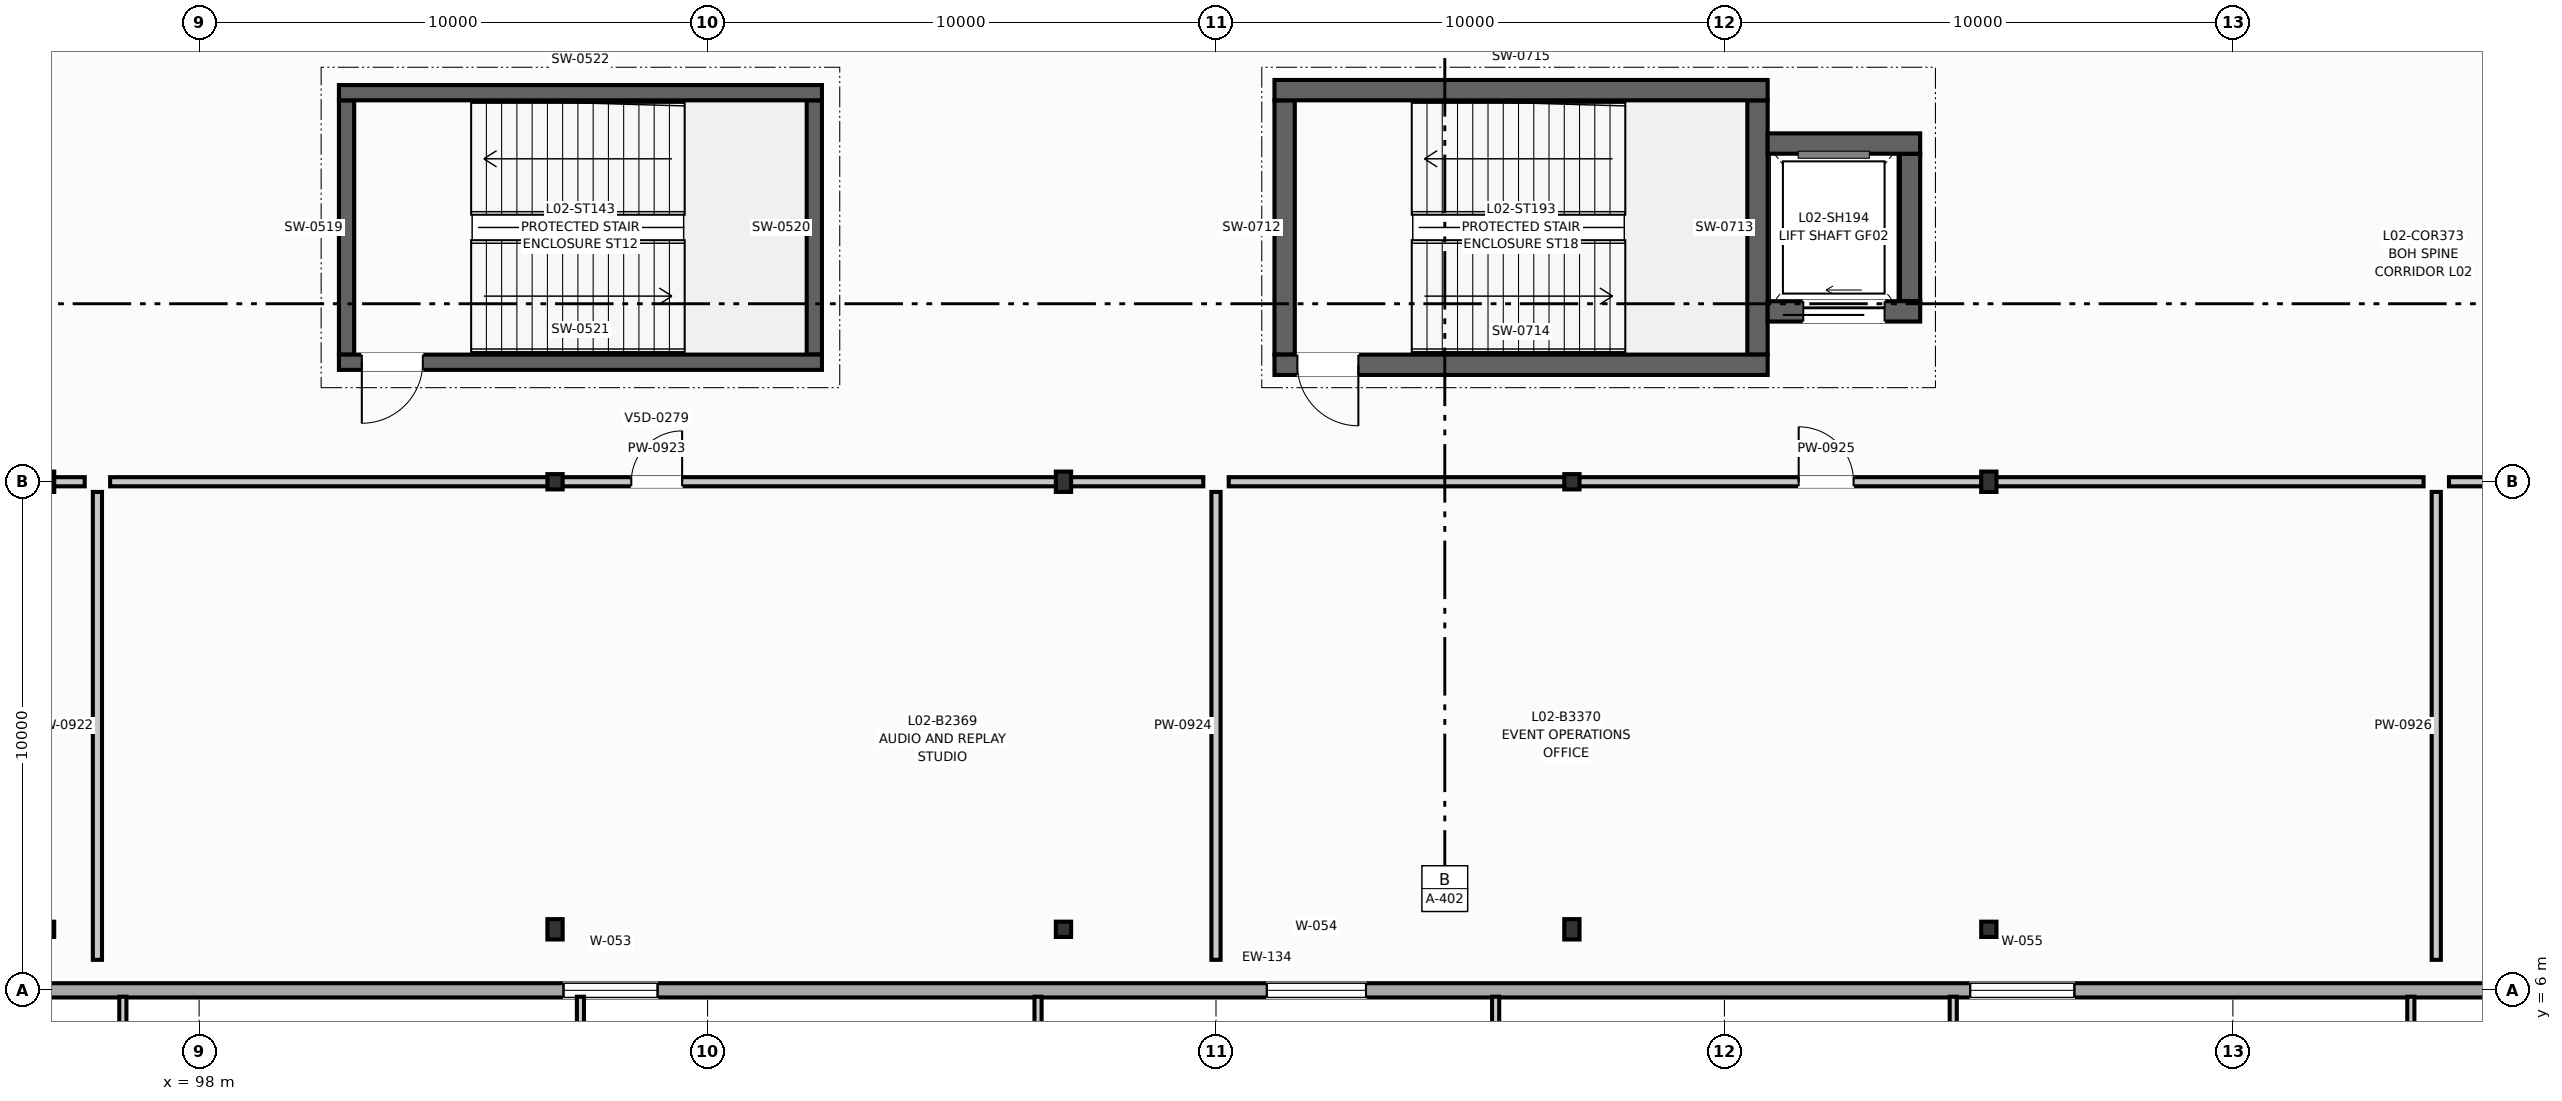
"""IFC4 building model, lengths in metres.
Left out: names, types, materials, properties, quantities, classifications, styles, units other than length and angle.
Written with IfcOpenShell. Run it as: python <this file> out.ifc"""

import sys

from ifc_helpers import new_model, si_unit, direction, frame, frame_2d, origin, origin_2d, place, context, subcontext, project, spatial, rectangle, i_section, extrude, element, fill, save


model = new_model("IFC4")
c1 = context("Model", 3, precision=1e-05, world=origin(), true_north=direction((0.0, 1.0)))
c2 = subcontext(c1, "Body", "Model", "MODEL_VIEW")
j1 = project(units=[si_unit("LENGTHUNIT", "METRE"), si_unit("PLANEANGLEUNIT", "RADIAN")], contexts=[c1])
p1 = place(None, origin())
s1 = spatial("IfcSite", under=j1, at=p1, CompositionType="ELEMENT")
p2 = place(p1, origin())
s2 = spatial("IfcBuilding", under=s1, at=p2, CompositionType="ELEMENT")
p3 = place(p2, frame((0.0, 0.0, 9.0)))
s3 = spatial("IfcBuildingStorey", under=s2, at=p3, CompositionType="ELEMENT", Elevation=9.0)
p4 = place(p3, frame((95.0, 7.2, 0.0), z_axis=(0.0, 0.0, 1.0), x_axis=(1.0, 0.0, 0.0)))
e1 = element("IfcColumn", 1, at=p4, inside=s3, PredefinedType="COLUMN", context=c2, shape_type="SweptSolid", body=[
    extrude(i_section(OverallWidth=0.3, OverallDepth=0.3, WebThickness=0.011, FlangeThickness=0.019, at=origin_2d()), origin(), (0.0, 0.0, 1.0), 4.5),
])
for number, where, z_axis, x_axis in (
    (2, (95.0, 16.0, 0.0), (0.0, 0.0, 1.0), (1.0, 0.0, 0.0)),
    (3, (105.0, 7.2, 0.0), (0.0, 0.0, 1.0), (1.0, 0.0, 0.0)),
):
    element("IfcColumn", number, at=place(p3, frame(where, z_axis=z_axis, x_axis=x_axis)), inside=s3, PredefinedType="COLUMN", context=c2, shape_type="SweptSolid", body=[
        extrude(i_section(OverallWidth=0.3, OverallDepth=0.4, WebThickness=0.013, FlangeThickness=0.024, at=origin_2d()), origin(), (0.0, 0.0, 1.0), 4.5),
    ])
for number, where, z_axis, x_axis in (
    (4, (105.0, 16.0, 0.0), (0.0, 0.0, 1.0), (1.0, 0.0, 0.0)),
    (5, (115.0, 7.2, 0.0), (0.0, 0.0, 1.0), (1.0, 0.0, 0.0)),
):
    element("IfcColumn", number, at=place(p3, frame(where, z_axis=z_axis, x_axis=x_axis)), inside=s3, PredefinedType="COLUMN", context=c2, shape_type="SweptSolid", body=[
        extrude(i_section(OverallWidth=0.3, OverallDepth=0.3, WebThickness=0.011, FlangeThickness=0.019, at=origin_2d()), origin(), (0.0, 0.0, 1.0), 4.5),
    ])
for number, where, z_axis, x_axis in (
    (6, (115.0, 16.0, 0.0), (0.0, 0.0, 1.0), (1.0, 0.0, 0.0)),
    (7, (125.0, 7.2, 0.0), (0.0, 0.0, 1.0), (1.0, 0.0, 0.0)),
):
    element("IfcColumn", number, at=place(p3, frame(where, z_axis=z_axis, x_axis=x_axis)), inside=s3, PredefinedType="COLUMN", context=c2, shape_type="SweptSolid", body=[
        extrude(i_section(OverallWidth=0.3, OverallDepth=0.4, WebThickness=0.013, FlangeThickness=0.024, at=origin_2d()), origin(), (0.0, 0.0, 1.0), 4.5),
    ])
for number, where, z_axis, x_axis in (
    (8, (125.0, 16.0, 0.0), (0.0, 0.0, 1.0), (1.0, 0.0, 0.0)),
    (9, (133.2, 7.2, 0.0), (0.0, 0.0, 1.0), (1.0, 0.0, 0.0)),
):
    element("IfcColumn", number, at=place(p3, frame(where, z_axis=z_axis, x_axis=x_axis)), inside=s3, PredefinedType="COLUMN", context=c2, shape_type="SweptSolid", body=[
        extrude(i_section(OverallWidth=0.3, OverallDepth=0.3, WebThickness=0.011, FlangeThickness=0.019, at=origin_2d()), origin(), (0.0, 0.0, 1.0), 4.5),
    ])
p5 = place(p3, frame((133.2, 16.0, 0.0), z_axis=(0.0, 0.0, 1.0), x_axis=(1.0, 0.0, 0.0)))
e10 = element("IfcColumn", 10, at=p5, inside=s3, PredefinedType="COLUMN", context=c2, shape_type="SweptSolid", body=[
    extrude(i_section(OverallWidth=0.3, OverallDepth=0.4, WebThickness=0.013, FlangeThickness=0.024, at=origin_2d()), origin(), (0.0, 0.0, 1.0), 4.5),
])
p6 = place(p3, frame((74.0, 6.0, 0.0), z_axis=(0.0, 0.0, 1.0), x_axis=(1.0, 0.0, 0.0)))
e11 = element("IfcWall", 11, at=p6, inside=s3, PredefinedType="SOLIDWALL", context=c2, shape_type="SweptSolid", body=[
    extrude(rectangle(XDim=90.0, YDim=0.28, at=frame_2d((45.0, 0.0))), origin(), (0.0, 0.0, 1.0), 3.5),
])
p7 = place(p6, frame((3.5, 0.0, 0.85)))
e12 = element("IfcOpeningElement", 12, at=p7, cuts=e11, PredefinedType="OPENING", context=c2, shape_type="SweptSolid", body=[
    extrude(rectangle(XDim=1.65, YDim=2.1, at=frame_2d((0.825, 1.05))), frame((0.0, 0.15, 0.0), z_axis=(0.0, -1.0, 0.0), x_axis=(1.0, 0.0, 0.0)), (0.0, 0.0, 1.0), 0.3),
])
p8 = place(p6, frame((17.333, 0.0, 0.85)))
e13 = element("IfcOpeningElement", 13, at=p8, cuts=e11, PredefinedType="OPENING", context=c2, shape_type="SweptSolid", body=[
    extrude(rectangle(XDim=1.75, YDim=2.15, at=frame_2d((0.875, 1.075))), frame((0.0, 0.15, 0.0), z_axis=(0.0, -1.0, 0.0), x_axis=(1.0, 0.0, 0.0)), (0.0, 0.0, 1.0), 0.3),
])
p9 = place(p6, frame((31.167, 0.0, 0.85)))
e14 = element("IfcOpeningElement", 14, at=p9, cuts=e11, PredefinedType="OPENING", context=c2, shape_type="SweptSolid", body=[
    extrude(rectangle(XDim=1.85, YDim=2.2, at=frame_2d((0.925, 1.1))), frame((0.0, 0.15, 0.0), z_axis=(0.0, -1.0, 0.0), x_axis=(1.0, 0.0, 0.0)), (0.0, 0.0, 1.0), 0.3),
])
p10 = place(p6, frame((45.0, 0.0, 0.85)))
e15 = element("IfcOpeningElement", 15, at=p10, cuts=e11, PredefinedType="OPENING", context=c2, shape_type="SweptSolid", body=[
    extrude(rectangle(XDim=1.95, YDim=2.25, at=frame_2d((0.975, 1.125))), frame((0.0, 0.15, 0.0), z_axis=(0.0, -1.0, 0.0), x_axis=(1.0, 0.0, 0.0)), (0.0, 0.0, 1.0), 0.3),
])
p11 = place(p6, frame((58.833, 0.0, 0.85)))
e16 = element("IfcOpeningElement", 16, at=p11, cuts=e11, PredefinedType="OPENING", context=c2, shape_type="SweptSolid", body=[
    extrude(rectangle(XDim=2.05, YDim=2.3, at=frame_2d((1.025, 1.15))), frame((0.0, 0.15, 0.0), z_axis=(0.0, -1.0, 0.0), x_axis=(1.0, 0.0, 0.0)), (0.0, 0.0, 1.0), 0.3),
])
p12 = place(p6, frame((72.667, 0.0, 0.85)))
e17 = element("IfcOpeningElement", 17, at=p12, cuts=e11, PredefinedType="OPENING", context=c2, shape_type="SweptSolid", body=[
    extrude(rectangle(XDim=2.15, YDim=2.35, at=frame_2d((1.075, 1.175))), frame((0.0, 0.15, 0.0), z_axis=(0.0, -1.0, 0.0), x_axis=(1.0, 0.0, 0.0)), (0.0, 0.0, 1.0), 0.3),
])
for number, where, z_axis, x_axis in (
    (18, (100.9, 18.5, 0.0), (0.0, 0.0, 1.0), (0.0, 1.0, 0.0)),
    (19, (110.1, 18.5, 0.0), (0.0, 0.0, 1.0), (0.0, 1.0, 0.0)),
):
    element("IfcWall", number, at=place(p3, frame(where, z_axis=z_axis, x_axis=x_axis)), inside=s3, PredefinedType="SHEAR", context=c2, shape_type="SweptSolid", body=[
        extrude(rectangle(XDim=5.0, YDim=0.3, at=frame_2d((2.5, 0.0))), origin(), (0.0, 0.0, 1.0), 4.25),
    ])
p13 = place(p3, frame((100.75, 18.35, 0.0), z_axis=(0.0, 0.0, 1.0), x_axis=(1.0, 0.0, 0.0)))
e20 = element("IfcWall", 20, at=p13, inside=s3, PredefinedType="SHEAR", context=c2, shape_type="SweptSolid", body=[
    extrude(rectangle(XDim=9.5, YDim=0.3, at=frame_2d((4.75, 0.0))), origin(), (0.0, 0.0, 1.0), 4.25),
])
p14 = place(p13, frame((0.45, 0.0, 0.0)))
e21 = element("IfcOpeningElement", 21, at=p14, cuts=e20, PredefinedType="OPENING", context=c2, shape_type="SweptSolid", body=[
    extrude(rectangle(XDim=1.2, YDim=2.2, at=frame_2d((0.6, 1.1))), frame((0.0, 0.16, 0.0), z_axis=(0.0, -1.0, 0.0), x_axis=(1.0, 0.0, 0.0)), (0.0, 0.0, 1.0), 0.32),
])
p15 = place(p3, frame((100.75, 23.65, 0.0), z_axis=(0.0, 0.0, 1.0), x_axis=(1.0, 0.0, 0.0)))
e22 = element("IfcWall", 22, at=p15, inside=s3, PredefinedType="SHEAR", context=c2, shape_type="SweptSolid", body=[
    extrude(rectangle(XDim=9.5, YDim=0.3, at=frame_2d((4.75, 0.0))), origin(), (0.0, 0.0, 1.0), 4.25),
])
for number, where, z_axis, x_axis in (
    (23, (119.35, 18.5, 0.0), (0.0, 0.0, 1.0), (0.0, 1.0, 0.0)),
    (24, (128.65, 18.5, 0.0), (0.0, 0.0, 1.0), (0.0, 1.0, 0.0)),
):
    element("IfcWall", number, at=place(p3, frame(where, z_axis=z_axis, x_axis=x_axis)), inside=s3, PredefinedType="SHEAR", context=c2, shape_type="SweptSolid", body=[
        extrude(rectangle(XDim=5.0, YDim=0.4, at=frame_2d((2.5, 0.0))), origin(), (0.0, 0.0, 1.0), 4.25),
    ])
p16 = place(p3, frame((119.15, 18.3, 0.0), z_axis=(0.0, 0.0, 1.0), x_axis=(1.0, 0.0, 0.0)))
e25 = element("IfcWall", 25, at=p16, inside=s3, PredefinedType="SHEAR", context=c2, shape_type="SweptSolid", body=[
    extrude(rectangle(XDim=9.7, YDim=0.4, at=frame_2d((4.85, 0.0))), origin(), (0.0, 0.0, 1.0), 4.25),
])
p17 = place(p16, frame((0.45, 0.0, 0.0)))
e26 = element("IfcOpeningElement", 26, at=p17, cuts=e25, PredefinedType="OPENING", context=c2, shape_type="SweptSolid", body=[
    extrude(rectangle(XDim=1.2, YDim=2.2, at=frame_2d((0.6, 1.1))), frame((0.0, 0.21, 0.0), z_axis=(0.0, -1.0, 0.0), x_axis=(1.0, 0.0, 0.0)), (0.0, 0.0, 1.0), 0.42),
])
p18 = place(p3, frame((119.15, 23.7, 0.0), z_axis=(0.0, 0.0, 1.0), x_axis=(1.0, 0.0, 0.0)))
e27 = element("IfcWall", 27, at=p18, inside=s3, PredefinedType="SHEAR", context=c2, shape_type="SweptSolid", body=[
    extrude(rectangle(XDim=9.7, YDim=0.4, at=frame_2d((4.85, 0.0))), origin(), (0.0, 0.0, 1.0), 4.25),
])
p19 = place(p3, frame((131.65, 19.55, 0.0), z_axis=(0.0, 0.0, 1.0), x_axis=(0.0, 1.0, 0.0)))
e28 = element("IfcWall", 28, at=p19, inside=s3, PredefinedType="SHEAR", context=c2, shape_type="SweptSolid", body=[
    extrude(rectangle(XDim=2.9, YDim=0.4, at=frame_2d((1.45, 0.0))), origin(), (0.0, 0.0, 1.0), 4.25),
])
p20 = place(p3, frame((128.85, 19.35, 0.0), z_axis=(0.0, 0.0, 1.0), x_axis=(1.0, 0.0, 0.0)))
e29 = element("IfcWall", 29, at=p20, inside=s3, PredefinedType="SHEAR", context=c2, shape_type="SweptSolid", body=[
    extrude(rectangle(XDim=3.0, YDim=0.4, at=frame_2d((1.5, 0.0))), origin(), (0.0, 0.0, 1.0), 4.25),
])
p21 = place(p20, frame((0.7, 0.0, 0.0)))
e30 = element("IfcOpeningElement", 30, at=p21, cuts=e29, PredefinedType="OPENING", context=c2, shape_type="SweptSolid", body=[
    extrude(rectangle(XDim=1.6, YDim=2.35, at=frame_2d((0.8, 1.175))), frame((0.0, 0.21, 0.0), z_axis=(0.0, -1.0, 0.0), x_axis=(1.0, 0.0, 0.0)), (0.0, 0.0, 1.0), 0.42),
])
p22 = place(p3, frame((128.85, 22.65, 0.0), z_axis=(0.0, 0.0, 1.0), x_axis=(1.0, 0.0, 0.0)))
e31 = element("IfcWall", 31, at=p22, inside=s3, PredefinedType="SHEAR", context=c2, shape_type="SweptSolid", body=[
    extrude(rectangle(XDim=3.0, YDim=0.4, at=frame_2d((1.5, 0.0))), origin(), (0.0, 0.0, 1.0), 4.25),
])
p23 = place(p3, frame((76.05, 16.0, 0.0), z_axis=(0.0, 0.0, 1.0), x_axis=(1.0, 0.0, 0.0)))
e32 = element("IfcWall", 32, at=p23, inside=s3, PredefinedType="PARTITIONING", context=c2, shape_type="SweptSolid", body=[
    extrude(rectangle(XDim=19.7, YDim=0.18, at=frame_2d((9.85, 0.0))), origin(), (0.0, 0.0, 1.0), 3.22),
])
p24 = place(p23, frame((6.622, 0.0, 0.0)))
e33 = element("IfcOpeningElement", 33, at=p24, cuts=e32, PredefinedType="OPENING", context=c2, shape_type="SweptSolid", body=[
    extrude(rectangle(XDim=0.94, YDim=2.12, at=frame_2d((0.47, 1.06))), frame((0.0, 0.1, 0.0), z_axis=(0.0, -1.0, 0.0), x_axis=(1.0, 0.0, 0.0)), (0.0, 0.0, 1.0), 0.2),
])
p25 = place(p3, frame((96.0, 6.6, 0.0), z_axis=(0.0, 0.0, 1.0), x_axis=(0.0, 1.0, 0.0)))
e34 = element("IfcWall", 34, at=p25, inside=s3, PredefinedType="PARTITIONING", context=c2, shape_type="SweptSolid", body=[
    extrude(rectangle(XDim=9.2, YDim=0.18, at=frame_2d((4.6, 0.0))), origin(), (0.0, 0.0, 1.0), 3.22),
])
p26 = place(p3, frame((96.25, 16.0, 0.0), z_axis=(0.0, 0.0, 1.0), x_axis=(1.0, 0.0, 0.0)))
e35 = element("IfcWall", 35, at=p26, inside=s3, PredefinedType="PARTITIONING", context=c2, shape_type="SweptSolid", body=[
    extrude(rectangle(XDim=21.5, YDim=0.18, at=frame_2d((10.75, 0.0))), origin(), (0.0, 0.0, 1.0), 3.22),
])
p27 = place(p26, frame((10.25, 0.0, 0.0)))
e36 = element("IfcOpeningElement", 36, at=p27, cuts=e35, PredefinedType="OPENING", context=c2, shape_type="SweptSolid", body=[
    extrude(rectangle(XDim=1.0, YDim=2.14, at=frame_2d((0.5, 1.07))), frame((0.0, 0.1, 0.0), z_axis=(0.0, -1.0, 0.0), x_axis=(1.0, 0.0, 0.0)), (0.0, 0.0, 1.0), 0.2),
])
p28 = place(p3, frame((118.0, 6.6, 0.0), z_axis=(0.0, 0.0, 1.0), x_axis=(0.0, 1.0, 0.0)))
e37 = element("IfcWall", 37, at=p28, inside=s3, PredefinedType="PARTITIONING", context=c2, shape_type="SweptSolid", body=[
    extrude(rectangle(XDim=9.2, YDim=0.18, at=frame_2d((4.6, 0.0))), origin(), (0.0, 0.0, 1.0), 3.22),
])
p29 = place(p3, frame((118.25, 16.0, 0.0), z_axis=(0.0, 0.0, 1.0), x_axis=(1.0, 0.0, 0.0)))
e38 = element("IfcWall", 38, at=p29, inside=s3, PredefinedType="PARTITIONING", context=c2, shape_type="SweptSolid", body=[
    extrude(rectangle(XDim=23.5, YDim=0.18, at=frame_2d((11.75, 0.0))), origin(), (0.0, 0.0, 1.0), 3.22),
])
p30 = place(p29, frame((11.21, 0.0, 0.0)))
e39 = element("IfcOpeningElement", 39, at=p30, cuts=e38, PredefinedType="OPENING", context=c2, shape_type="SweptSolid", body=[
    extrude(rectangle(XDim=1.08, YDim=2.16, at=frame_2d((0.54, 1.08))), frame((0.0, 0.1, 0.0), z_axis=(0.0, -1.0, 0.0), x_axis=(1.0, 0.0, 0.0)), (0.0, 0.0, 1.0), 0.2),
])
p31 = place(p3, frame((142.0, 6.6, 0.0), z_axis=(0.0, 0.0, 1.0), x_axis=(0.0, 1.0, 0.0)))
e40 = element("IfcWall", 40, at=p31, inside=s3, PredefinedType="PARTITIONING", context=c2, shape_type="SweptSolid", body=[
    extrude(rectangle(XDim=9.2, YDim=0.18, at=frame_2d((4.6, 0.0))), origin(), (0.0, 0.0, 1.0), 3.22),
])
p32 = place(p3, frame((142.25, 16.0, 0.0), z_axis=(0.0, 0.0, 1.0), x_axis=(1.0, 0.0, 0.0)))
e41 = element("IfcWall", 41, at=p32, inside=s3, PredefinedType="PARTITIONING", context=c2, shape_type="SweptSolid", body=[
    extrude(rectangle(XDim=11.5, YDim=0.18, at=frame_2d((5.75, 0.0))), origin(), (0.0, 0.0, 1.0), 3.22),
])
p33 = place(p32, frame((5.26, 0.0, 0.0)))
e42 = element("IfcOpeningElement", 42, at=p33, cuts=e41, PredefinedType="OPENING", context=c2, shape_type="SweptSolid", body=[
    extrude(rectangle(XDim=0.98, YDim=2.15, at=frame_2d((0.49, 1.075))), frame((0.0, 0.1, 0.0), z_axis=(0.0, -1.0, 0.0), x_axis=(1.0, 0.0, 0.0)), (0.0, 0.0, 1.0), 0.2),
])
p34 = place(p9, origin())
e43 = element("IfcWindow", 43, at=p34, inside=s3, PartitioningType="SINGLE_PANEL", PredefinedType="WINDOW", context=c2, shape_type="SweptSolid", body=[
    extrude(rectangle(XDim=1.85, YDim=2.2, at=frame_2d((0.925, 1.1))), frame((0.0, 0.03, 0.0), z_axis=(0.0, -1.0, 0.0), x_axis=(1.0, 0.0, 0.0)), (0.0, 0.0, 1.0), 0.06),
])
fill(e14, e43)
p35 = place(p10, origin())
e44 = element("IfcWindow", 44, at=p35, inside=s3, PartitioningType="SINGLE_PANEL", PredefinedType="WINDOW", context=c2, shape_type="SweptSolid", body=[
    extrude(rectangle(XDim=1.95, YDim=2.25, at=frame_2d((0.975, 1.125))), frame((0.0, 0.03, 0.0), z_axis=(0.0, -1.0, 0.0), x_axis=(1.0, 0.0, 0.0)), (0.0, 0.0, 1.0), 0.06),
])
fill(e15, e44)
p36 = place(p11, origin())
e45 = element("IfcWindow", 45, at=p36, inside=s3, PartitioningType="SINGLE_PANEL", PredefinedType="WINDOW", context=c2, shape_type="SweptSolid", body=[
    extrude(rectangle(XDim=2.05, YDim=2.3, at=frame_2d((1.025, 1.15))), frame((0.0, 0.03, 0.0), z_axis=(0.0, -1.0, 0.0), x_axis=(1.0, 0.0, 0.0)), (0.0, 0.0, 1.0), 0.06),
])
fill(e16, e45)
p37 = place(p14, frame((1.2, 0.0, 0.0), z_axis=(0.0, 0.0, 1.0), x_axis=(-1.0, 0.0, 0.0)))
e46 = element("IfcDoor", 46, at=p37, inside=s3, OperationType="SINGLE_SWING_LEFT", PredefinedType="DOOR", context=c2, shape_type="SweptSolid", body=[
    extrude(rectangle(XDim=1.2, YDim=2.2, at=frame_2d((0.6, 1.1))), frame((0.0, 0.025, 0.0), z_axis=(0.0, -1.0, 0.0), x_axis=(1.0, 0.0, 0.0)), (0.0, 0.0, 1.0), 0.05),
])
fill(e21, e46)
p38 = place(p17, frame((1.2, 0.0, 0.0), z_axis=(0.0, 0.0, 1.0), x_axis=(-1.0, 0.0, 0.0)))
e47 = element("IfcDoor", 47, at=p38, inside=s3, OperationType="SINGLE_SWING_RIGHT", PredefinedType="DOOR", context=c2, shape_type="SweptSolid", body=[
    extrude(rectangle(XDim=1.2, YDim=2.2, at=frame_2d((0.6, 1.1))), frame((0.0, 0.025, 0.0), z_axis=(0.0, -1.0, 0.0), x_axis=(1.0, 0.0, 0.0)), (0.0, 0.0, 1.0), 0.05),
])
fill(e26, e47)
p39 = place(p21, origin())
e48 = element("IfcDoor", 48, at=p39, inside=s3, OperationType="SLIDING_TO_LEFT", PredefinedType="DOOR", context=c2, shape_type="SweptSolid", body=[
    extrude(rectangle(XDim=1.6, YDim=2.35, at=frame_2d((0.8, 1.175))), frame((0.0, 0.025, 0.0), z_axis=(0.0, -1.0, 0.0), x_axis=(1.0, 0.0, 0.0)), (0.0, 0.0, 1.0), 0.05),
])
fill(e30, e48)
p40 = place(p27, origin())
e49 = element("IfcDoor", 49, at=p40, inside=s3, OperationType="SINGLE_SWING_RIGHT", PredefinedType="DOOR", context=c2, shape_type="SweptSolid", body=[
    extrude(rectangle(XDim=1.0, YDim=2.14, at=frame_2d((0.5, 1.07))), frame((0.0, 0.025, 0.0), z_axis=(0.0, -1.0, 0.0), x_axis=(1.0, 0.0, 0.0)), (0.0, 0.0, 1.0), 0.05),
])
fill(e36, e49)
p41 = place(p30, origin())
e50 = element("IfcDoor", 50, at=p41, inside=s3, OperationType="SINGLE_SWING_LEFT", PredefinedType="DOOR", context=c2, shape_type="SweptSolid", body=[
    extrude(rectangle(XDim=1.08, YDim=2.16, at=frame_2d((0.54, 1.08))), frame((0.0, 0.025, 0.0), z_axis=(0.0, -1.0, 0.0), x_axis=(1.0, 0.0, 0.0)), (0.0, 0.0, 1.0), 0.05),
])
fill(e39, e50)
save(model, sys.argv[1])
